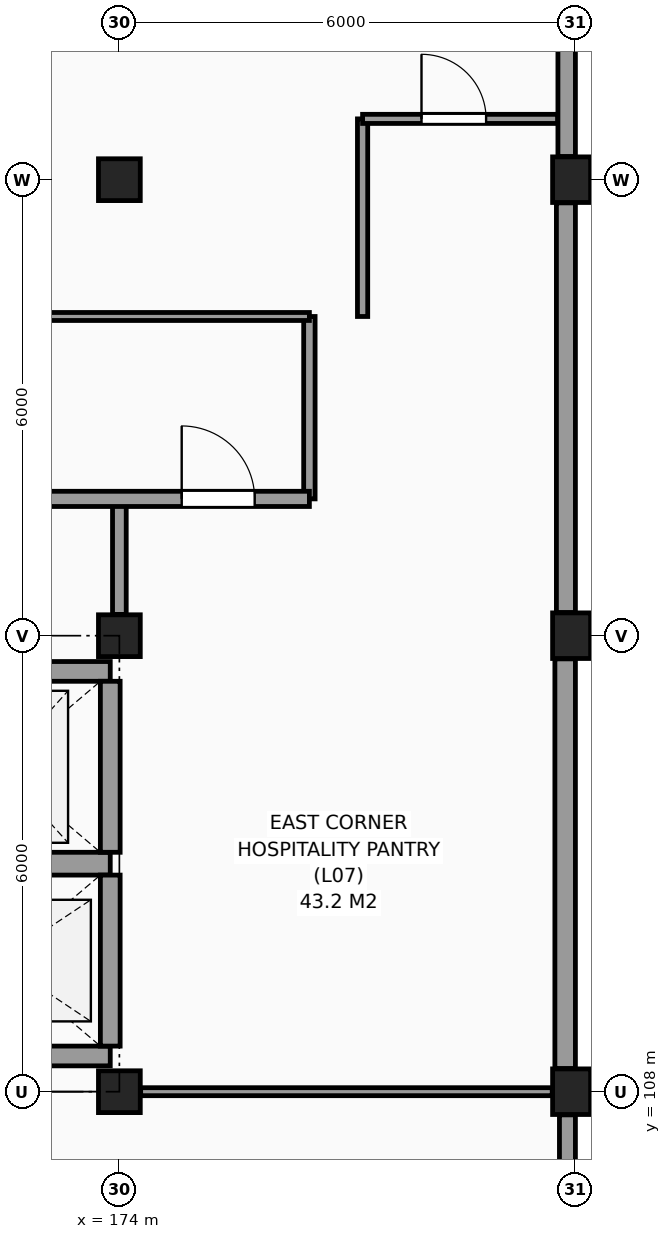
"""IFC4 building model, lengths in metres.
Left out: names, types, materials, properties, quantities, classifications, styles, units other than length and angle.
Written with IfcOpenShell. Run it as: python <this file> out.ifc"""

import sys

from ifc_helpers import new_model, si_unit, direction, frame, frame_2d, origin, origin_2d, place, context, subcontext, project, spatial, rectangle, extrude, element, fill, save


model = new_model("IFC4")
c1 = context("Model", 3, precision=1e-05, world=origin(), true_north=direction((0.0, 1.0)))
c2 = subcontext(c1, "Body", "Model", "MODEL_VIEW")
j1 = project(units=[si_unit("LENGTHUNIT", "METRE"), si_unit("PLANEANGLEUNIT", "RADIAN")], contexts=[c1])
p1 = place(None, origin())
s1 = spatial("IfcSite", under=j1, at=p1, CompositionType="ELEMENT")
p2 = place(p1, origin())
s2 = spatial("IfcBuilding", under=s1, at=p2, CompositionType="ELEMENT")
p3 = place(p2, frame((0.0, 0.0, 31.5)))
s3 = spatial("IfcBuildingStorey", under=s2, at=p3, CompositionType="ELEMENT", Elevation=31.5)
for number, where, z_axis, x_axis in (
    (1, (174.0, 108.0, 0.0), (0.0, 0.0, 1.0), (1.0, 0.0, 0.0)),
    (2, (174.0, 114.0, 0.0), (0.0, 0.0, 1.0), (1.0, 0.0, 0.0)),
    (3, (174.0, 120.0, 0.0), (0.0, 0.0, 1.0), (1.0, 0.0, 0.0)),
):
    element("IfcColumn", number, at=place(p3, frame(where, z_axis=z_axis, x_axis=x_axis)), inside=s3, PredefinedType="COLUMN", context=c2, shape_type="SweptSolid", body=[
        extrude(rectangle(XDim=0.55, YDim=0.55, at=origin_2d()), origin(), (0.0, 0.0, 1.0), 3.3),
    ])
for number, where, z_axis, x_axis in (
    (4, (180.0, 108.0, 0.0), (0.0, 0.0, 1.0), (1.0, 0.0, 0.0)),
    (5, (180.0, 114.0, 0.0), (0.0, 0.0, 1.0), (1.0, 0.0, 0.0)),
    (6, (180.0, 120.0, 0.0), (0.0, 0.0, 1.0), (1.0, 0.0, 0.0)),
):
    element("IfcColumn", number, at=place(p3, frame(where, z_axis=z_axis, x_axis=x_axis)), inside=s3, PredefinedType="COLUMN", context=c2, shape_type="SweptSolid", body=[
        extrude(rectangle(XDim=0.6, YDim=0.6, at=origin_2d()), origin(), (0.0, 0.0, 1.0), 3.3),
    ])
p4 = place(p3, frame((179.895, 102.305, 0.0), z_axis=(0.0, 0.0, 1.0), x_axis=(0.0, 1.0, 0.0)))
e7 = element("IfcWall", 7, at=p4, inside=s3, PredefinedType="SOLIDWALL", context=c2, shape_type="SweptSolid", body=[
    extrude(rectangle(XDim=5.39, YDim=0.21, at=frame_2d((2.695, 0.0))), origin(), (0.0, 0.0, 1.0), 2.42),
])
p5 = place(p4, frame((1.995, 0.0, 0.8)))
e8 = element("IfcOpeningElement", 8, at=p5, cuts=e7, PredefinedType="OPENING", context=c2, shape_type="SweptSolid", body=[
    extrude(rectangle(XDim=1.4, YDim=1.4, at=frame_2d((0.7, 0.7))), frame((0.0, 0.115, 0.0), z_axis=(0.0, -1.0, 0.0), x_axis=(1.0, 0.0, 0.0)), (0.0, 0.0, 1.0), 0.23),
])
p6 = place(p3, frame((179.865, 108.305, 0.0), z_axis=(0.0, 0.0, 1.0), x_axis=(0.0, 1.0, 0.0)))
e9 = element("IfcWall", 9, at=p6, inside=s3, PredefinedType="SOLIDWALL", context=c2, shape_type="SweptSolid", body=[
    extrude(rectangle(XDim=5.39, YDim=0.27, at=frame_2d((2.695, 0.0))), origin(), (0.0, 0.0, 1.0), 2.42),
])
p7 = place(p3, frame((179.875, 114.305, 0.0), z_axis=(0.0, 0.0, 1.0), x_axis=(0.0, 1.0, 0.0)))
e10 = element("IfcWall", 10, at=p7, inside=s3, PredefinedType="SOLIDWALL", context=c2, shape_type="SweptSolid", body=[
    extrude(rectangle(XDim=5.39, YDim=0.25, at=frame_2d((2.695, 0.0))), origin(), (0.0, 0.0, 1.0), 2.42),
])
p8 = place(p3, frame((179.885, 120.305, 0.0), z_axis=(0.0, 0.0, 1.0), x_axis=(0.0, 1.0, 0.0)))
e11 = element("IfcWall", 11, at=p8, inside=s3, PredefinedType="SOLIDWALL", context=c2, shape_type="SweptSolid", body=[
    extrude(rectangle(XDim=5.39, YDim=0.23, at=frame_2d((2.695, 0.0))), origin(), (0.0, 0.0, 1.0), 2.42),
])
p9 = place(p3, frame((170.97, 108.47, 0.0), z_axis=(0.0, 0.0, 1.0), x_axis=(1.0, 0.0, 0.0)))
e12 = element("IfcWall", 12, at=p9, inside=s3, PredefinedType="SHEAR", context=c2, shape_type="SweptSolid", body=[
    extrude(rectangle(XDim=2.91, YDim=0.26, at=frame_2d((1.455, 0.0))), origin(), (0.0, 0.0, 1.0), 3.3),
])
p10 = place(p3, frame((170.97, 111.0, 0.0), z_axis=(0.0, 0.0, 1.0), x_axis=(1.0, 0.0, 0.0)))
e13 = element("IfcWall", 13, at=p10, inside=s3, PredefinedType="SHEAR", context=c2, shape_type="SweptSolid", body=[
    extrude(rectangle(XDim=2.91, YDim=0.3, at=frame_2d((1.455, 0.0))), origin(), (0.0, 0.0, 1.0), 3.3),
])
p11 = place(p3, frame((173.88, 108.6, 0.0), z_axis=(0.0, 0.0, 1.0), x_axis=(0.0, 1.0, 0.0)))
e14 = element("IfcWall", 14, at=p11, inside=s3, PredefinedType="SHEAR", context=c2, shape_type="SweptSolid", body=[
    extrude(rectangle(XDim=2.25, YDim=0.26, at=frame_2d((1.125, 0.0))), origin(), (0.0, 0.0, 1.0), 3.3),
])
p12 = place(p3, frame((170.97, 113.53, 0.0), z_axis=(0.0, 0.0, 1.0), x_axis=(1.0, 0.0, 0.0)))
e15 = element("IfcWall", 15, at=p12, inside=s3, PredefinedType="SHEAR", context=c2, shape_type="SweptSolid", body=[
    extrude(rectangle(XDim=2.91, YDim=0.26, at=frame_2d((1.455, 0.0))), origin(), (0.0, 0.0, 1.0), 3.3),
])
p13 = place(p3, frame((173.88, 111.15, 0.0), z_axis=(0.0, 0.0, 1.0), x_axis=(0.0, 1.0, 0.0)))
e16 = element("IfcWall", 16, at=p13, inside=s3, PredefinedType="SHEAR", context=c2, shape_type="SweptSolid", body=[
    extrude(rectangle(XDim=2.25, YDim=0.26, at=frame_2d((1.125, 0.0))), origin(), (0.0, 0.0, 1.0), 3.3),
])
p14 = place(p3, frame((174.0, 114.28, 0.0), z_axis=(0.0, 0.0, 1.0), x_axis=(0.0, 1.0, 0.0)))
e17 = element("IfcWall", 17, at=p14, inside=s3, PredefinedType="PARTITIONING", context=c2, shape_type="SweptSolid", body=[
    extrude(rectangle(XDim=1.52, YDim=0.18, at=frame_2d((0.76, 0.0))), origin(), (0.0, 0.0, 1.0), 2.52),
])
p15 = place(p3, frame((176.5, 115.8, 0.0), z_axis=(0.0, 0.0, 1.0), x_axis=(0.0, 1.0, 0.0)))
e18 = element("IfcWall", 18, at=p15, inside=s3, PredefinedType="PARTITIONING", context=c2, shape_type="SweptSolid", body=[
    extrude(rectangle(XDim=2.4, YDim=0.15, at=frame_2d((1.2, 0.0))), origin(), (0.0, 0.0, 1.0), 3.07),
])
p16 = place(p3, frame((177.2, 118.2, 0.0), z_axis=(0.0, 0.0, 1.0), x_axis=(0.0, 1.0, 0.0)))
e19 = element("IfcWall", 19, at=p16, inside=s3, PredefinedType="PARTITIONING", context=c2, shape_type="SweptSolid", body=[
    extrude(rectangle(XDim=2.6, YDim=0.135, at=frame_2d((1.3, 0.0))), origin(), (0.0, 0.0, 1.0), 3.07),
])
p17 = place(p3, frame((174.28, 108.0, 0.0), z_axis=(0.0, 0.0, 1.0), x_axis=(1.0, 0.0, 0.0)))
e20 = element("IfcWall", 20, at=p17, inside=s3, PredefinedType="PARTITIONING", context=c2, shape_type="SweptSolid", body=[
    extrude(rectangle(XDim=5.415, YDim=0.105, at=frame_2d((2.708, 0.0))), origin(), (0.0, 0.0, 1.0), 2.47),
])
p18 = place(p3, frame((172.2, 115.8, 0.0), z_axis=(0.0, 0.0, 1.0), x_axis=(1.0, 0.0, 0.0)))
e21 = element("IfcWall", 21, at=p18, inside=s3, PredefinedType="PARTITIONING", context=c2, shape_type="SweptSolid", body=[
    extrude(rectangle(XDim=4.3, YDim=0.2, at=frame_2d((2.15, 0.0))), origin(), (0.0, 0.0, 1.0), 3.07),
])
p19 = place(p18, frame((2.62, 0.0, 0.0)))
e22 = element("IfcOpeningElement", 22, at=p19, cuts=e21, PredefinedType="OPENING", context=c2, shape_type="SweptSolid", body=[
    extrude(rectangle(XDim=0.96, YDim=2.15, at=frame_2d((0.48, 1.075))), frame((0.0, 0.11, 0.0), z_axis=(0.0, -1.0, 0.0), x_axis=(1.0, 0.0, 0.0)), (0.0, 0.0, 1.0), 0.22),
])
p20 = place(p3, frame((66.215, 118.2, 0.0), z_axis=(0.0, 0.0, 1.0), x_axis=(1.0, 0.0, 0.0)))
e23 = element("IfcWall", 23, at=p20, inside=s3, PredefinedType="PARTITIONING", context=c2, shape_type="SweptSolid", body=[
    extrude(rectangle(XDim=110.285, YDim=0.105, at=frame_2d((55.143, 0.0))), origin(), (0.0, 0.0, 1.0), 3.07),
])
p21 = place(p20, frame((8.36, 0.0, 0.0)))
e24 = element("IfcOpeningElement", 24, at=p21, cuts=e23, PredefinedType="OPENING", context=c2, shape_type="SweptSolid", body=[
    extrude(rectangle(XDim=0.95, YDim=2.1, at=frame_2d((0.475, 1.05))), frame((0.0, 0.062, 0.0), z_axis=(0.0, -1.0, 0.0), x_axis=(1.0, 0.0, 0.0)), (0.0, 0.0, 1.0), 0.125),
])
p22 = place(p20, frame((12.51, 0.0, 0.0)))
e25 = element("IfcOpeningElement", 25, at=p22, cuts=e23, PredefinedType="OPENING", context=c2, shape_type="SweptSolid", body=[
    extrude(rectangle(XDim=0.95, YDim=2.1, at=frame_2d((0.475, 1.05))), frame((0.0, 0.062, 0.0), z_axis=(0.0, -1.0, 0.0), x_axis=(1.0, 0.0, 0.0)), (0.0, 0.0, 1.0), 0.125),
])
p23 = place(p20, frame((16.91, 0.0, 0.0)))
e26 = element("IfcOpeningElement", 26, at=p23, cuts=e23, PredefinedType="OPENING", context=c2, shape_type="SweptSolid", body=[
    extrude(rectangle(XDim=0.95, YDim=2.1, at=frame_2d((0.475, 1.05))), frame((0.0, 0.062, 0.0), z_axis=(0.0, -1.0, 0.0), x_axis=(1.0, 0.0, 0.0)), (0.0, 0.0, 1.0), 0.125),
])
p24 = place(p20, frame((21.41, 0.0, 0.0)))
e27 = element("IfcOpeningElement", 27, at=p24, cuts=e23, PredefinedType="OPENING", context=c2, shape_type="SweptSolid", body=[
    extrude(rectangle(XDim=0.95, YDim=2.1, at=frame_2d((0.475, 1.05))), frame((0.0, 0.062, 0.0), z_axis=(0.0, -1.0, 0.0), x_axis=(1.0, 0.0, 0.0)), (0.0, 0.0, 1.0), 0.125),
])
p25 = place(p20, frame((30.51, 0.0, 0.0)))
e28 = element("IfcOpeningElement", 28, at=p25, cuts=e23, PredefinedType="OPENING", context=c2, shape_type="SweptSolid", body=[
    extrude(rectangle(XDim=0.95, YDim=2.1, at=frame_2d((0.475, 1.05))), frame((0.0, 0.062, 0.0), z_axis=(0.0, -1.0, 0.0), x_axis=(1.0, 0.0, 0.0)), (0.0, 0.0, 1.0), 0.125),
])
p26 = place(p20, frame((34.91, 0.0, 0.0)))
e29 = element("IfcOpeningElement", 29, at=p26, cuts=e23, PredefinedType="OPENING", context=c2, shape_type="SweptSolid", body=[
    extrude(rectangle(XDim=0.95, YDim=2.1, at=frame_2d((0.475, 1.05))), frame((0.0, 0.062, 0.0), z_axis=(0.0, -1.0, 0.0), x_axis=(1.0, 0.0, 0.0)), (0.0, 0.0, 1.0), 0.125),
])
p27 = place(p20, frame((42.11, 0.0, 0.0)))
e30 = element("IfcOpeningElement", 30, at=p27, cuts=e23, PredefinedType="OPENING", context=c2, shape_type="SweptSolid", body=[
    extrude(rectangle(XDim=0.95, YDim=2.1, at=frame_2d((0.475, 1.05))), frame((0.0, 0.062, 0.0), z_axis=(0.0, -1.0, 0.0), x_axis=(1.0, 0.0, 0.0)), (0.0, 0.0, 1.0), 0.125),
])
p28 = place(p20, frame((50.36, 0.0, 0.0)))
e31 = element("IfcOpeningElement", 31, at=p28, cuts=e23, PredefinedType="OPENING", context=c2, shape_type="SweptSolid", body=[
    extrude(rectangle(XDim=0.95, YDim=2.1, at=frame_2d((0.475, 1.05))), frame((0.0, 0.062, 0.0), z_axis=(0.0, -1.0, 0.0), x_axis=(1.0, 0.0, 0.0)), (0.0, 0.0, 1.0), 0.125),
])
p29 = place(p20, frame((62.36, 0.0, 0.0)))
e32 = element("IfcOpeningElement", 32, at=p29, cuts=e23, PredefinedType="OPENING", context=c2, shape_type="SweptSolid", body=[
    extrude(rectangle(XDim=0.95, YDim=2.1, at=frame_2d((0.475, 1.05))), frame((0.0, 0.062, 0.0), z_axis=(0.0, -1.0, 0.0), x_axis=(1.0, 0.0, 0.0)), (0.0, 0.0, 1.0), 0.125),
])
p30 = place(p20, frame((64.91, 0.0, 0.0)))
e33 = element("IfcOpeningElement", 33, at=p30, cuts=e23, PredefinedType="OPENING", context=c2, shape_type="SweptSolid", body=[
    extrude(rectangle(XDim=0.95, YDim=2.1, at=frame_2d((0.475, 1.05))), frame((0.0, 0.062, 0.0), z_axis=(0.0, -1.0, 0.0), x_axis=(1.0, 0.0, 0.0)), (0.0, 0.0, 1.0), 0.125),
])
p31 = place(p20, frame((72.11, 0.0, 0.0)))
e34 = element("IfcOpeningElement", 34, at=p31, cuts=e23, PredefinedType="OPENING", context=c2, shape_type="SweptSolid", body=[
    extrude(rectangle(XDim=0.95, YDim=2.1, at=frame_2d((0.475, 1.05))), frame((0.0, 0.062, 0.0), z_axis=(0.0, -1.0, 0.0), x_axis=(1.0, 0.0, 0.0)), (0.0, 0.0, 1.0), 0.125),
])
p32 = place(p20, frame((76.31, 0.0, 0.0)))
e35 = element("IfcOpeningElement", 35, at=p32, cuts=e23, PredefinedType="OPENING", context=c2, shape_type="SweptSolid", body=[
    extrude(rectangle(XDim=0.95, YDim=2.1, at=frame_2d((0.475, 1.05))), frame((0.0, 0.062, 0.0), z_axis=(0.0, -1.0, 0.0), x_axis=(1.0, 0.0, 0.0)), (0.0, 0.0, 1.0), 0.125),
])
p33 = place(p20, frame((78.51, 0.0, 0.0)))
e36 = element("IfcOpeningElement", 36, at=p33, cuts=e23, PredefinedType="OPENING", context=c2, shape_type="SweptSolid", body=[
    extrude(rectangle(XDim=0.95, YDim=2.1, at=frame_2d((0.475, 1.05))), frame((0.0, 0.062, 0.0), z_axis=(0.0, -1.0, 0.0), x_axis=(1.0, 0.0, 0.0)), (0.0, 0.0, 1.0), 0.125),
])
p34 = place(p20, frame((84.51, 0.0, 0.0)))
e37 = element("IfcOpeningElement", 37, at=p34, cuts=e23, PredefinedType="OPENING", context=c2, shape_type="SweptSolid", body=[
    extrude(rectangle(XDim=0.95, YDim=2.1, at=frame_2d((0.475, 1.05))), frame((0.0, 0.062, 0.0), z_axis=(0.0, -1.0, 0.0), x_axis=(1.0, 0.0, 0.0)), (0.0, 0.0, 1.0), 0.125),
])
p35 = place(p20, frame((98.36, 0.0, 0.0)))
e38 = element("IfcOpeningElement", 38, at=p35, cuts=e23, PredefinedType="OPENING", context=c2, shape_type="SweptSolid", body=[
    extrude(rectangle(XDim=0.95, YDim=2.1, at=frame_2d((0.475, 1.05))), frame((0.0, 0.062, 0.0), z_axis=(0.0, -1.0, 0.0), x_axis=(1.0, 0.0, 0.0)), (0.0, 0.0, 1.0), 0.125),
])
p36 = place(p20, frame((104.26, 0.0, 0.0)))
e39 = element("IfcOpeningElement", 39, at=p36, cuts=e23, PredefinedType="OPENING", context=c2, shape_type="SweptSolid", body=[
    extrude(rectangle(XDim=0.95, YDim=2.1, at=frame_2d((0.475, 1.05))), frame((0.0, 0.062, 0.0), z_axis=(0.0, -1.0, 0.0), x_axis=(1.0, 0.0, 0.0)), (0.0, 0.0, 1.0), 0.125),
])
p37 = place(p3, frame((177.2, 120.8, 0.0), z_axis=(0.0, 0.0, 1.0), x_axis=(1.0, 0.0, 0.0)))
e40 = element("IfcWall", 40, at=p37, inside=s3, PredefinedType="PARTITIONING", context=c2, shape_type="SweptSolid", body=[
    extrude(rectangle(XDim=2.565, YDim=0.12, at=frame_2d((1.282, 0.0))), origin(), (0.0, 0.0, 1.0), 3.07),
])
p38 = place(p37, frame((0.775, 0.0, 0.0)))
e41 = element("IfcOpeningElement", 41, at=p38, cuts=e40, PredefinedType="OPENING", context=c2, shape_type="SweptSolid", body=[
    extrude(rectangle(XDim=0.85, YDim=2.1, at=frame_2d((0.425, 1.05))), frame((0.0, 0.07, 0.0), z_axis=(0.0, -1.0, 0.0), x_axis=(1.0, 0.0, 0.0)), (0.0, 0.0, 1.0), 0.14),
])
p39 = place(p38, origin())
e42 = element("IfcDoor", 42, at=p39, inside=s3, OperationType="SINGLE_SWING_LEFT", PredefinedType="DOOR", context=c2, shape_type="SweptSolid", body=[
    extrude(rectangle(XDim=0.85, YDim=2.1, at=frame_2d((0.425, 1.05))), frame((0.0, 0.025, 0.0), z_axis=(0.0, -1.0, 0.0), x_axis=(1.0, 0.0, 0.0)), (0.0, 0.0, 1.0), 0.05),
])
fill(e41, e42)
p40 = place(p19, origin())
e43 = element("IfcDoor", 43, at=p40, inside=s3, OperationType="SINGLE_SWING_LEFT", PredefinedType="DOOR", context=c2, shape_type="SweptSolid", body=[
    extrude(rectangle(XDim=0.96, YDim=2.15, at=frame_2d((0.48, 1.075))), frame((0.0, 0.025, 0.0), z_axis=(0.0, -1.0, 0.0), x_axis=(1.0, 0.0, 0.0)), (0.0, 0.0, 1.0), 0.05),
])
fill(e22, e43)
save(model, sys.argv[1])
